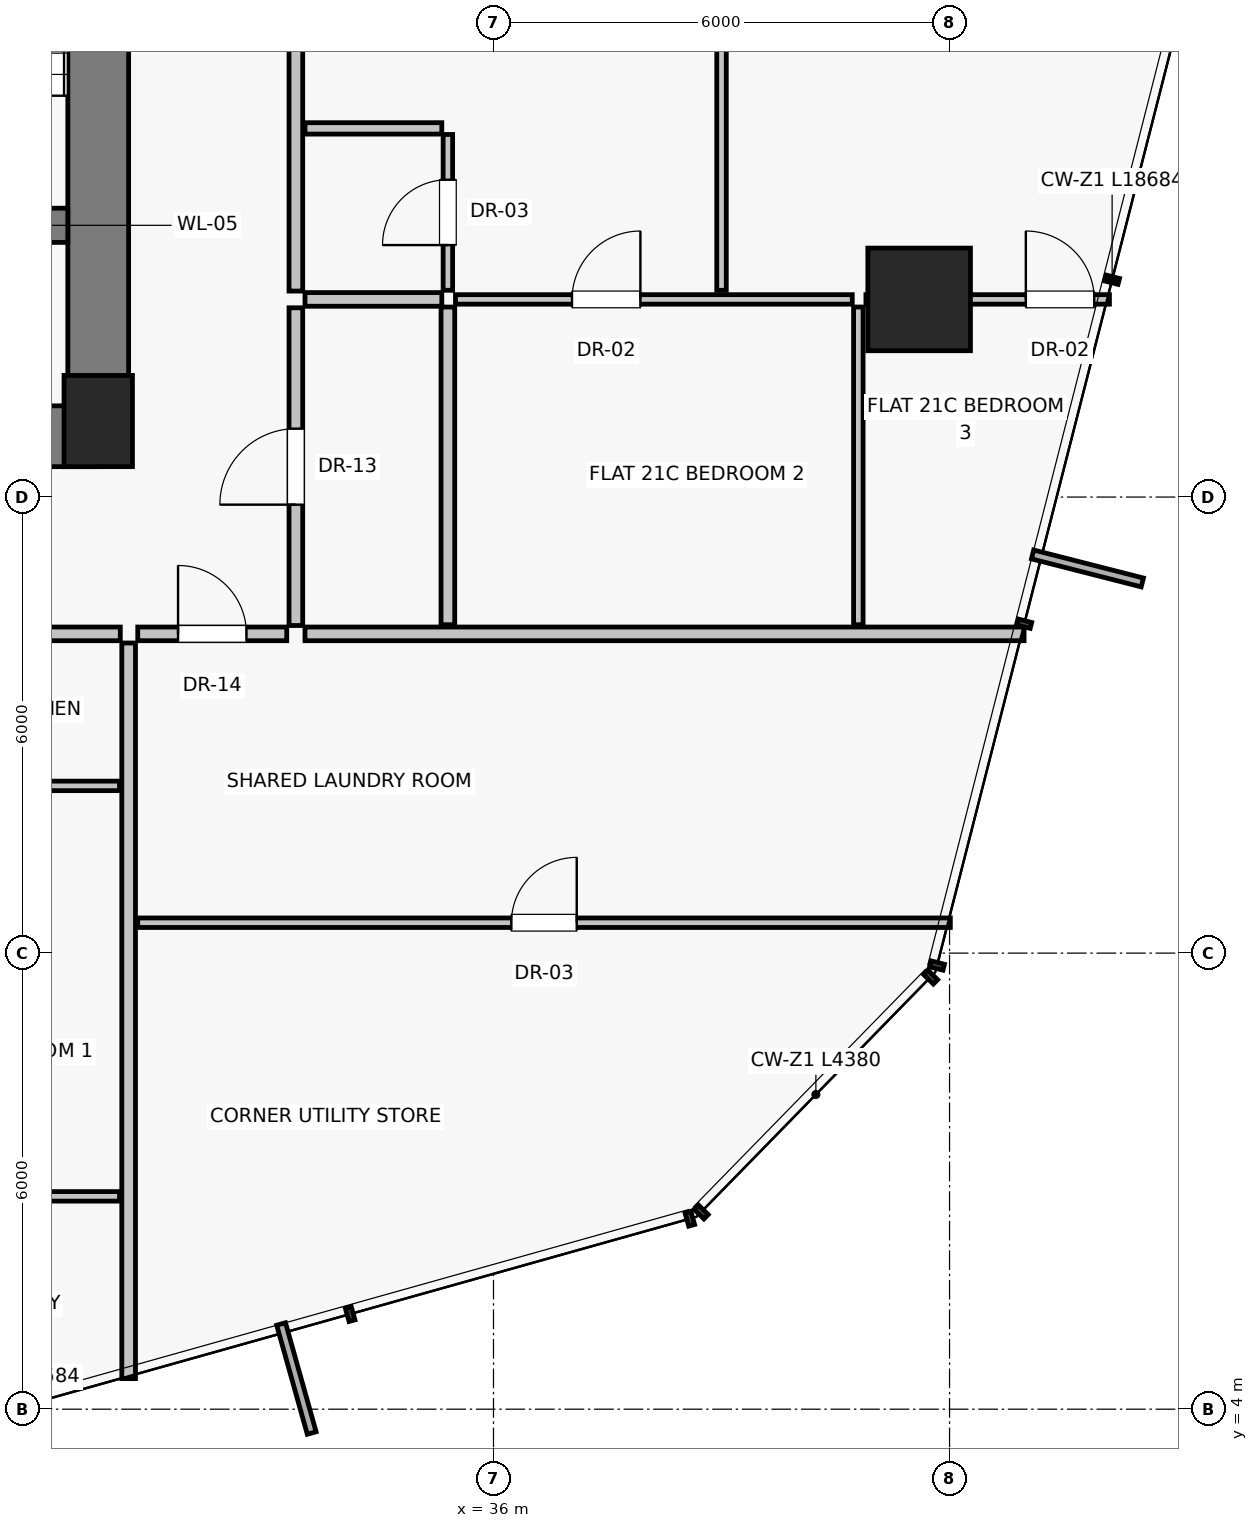
"""IFC4 building model, lengths in metres.
Left out: names, types, materials, properties, quantities, classifications, styles, units other than length and angle.
Written with IfcOpenShell. Run it as: python <this file> out.ifc"""

import sys

from ifc_helpers import new_model, si_unit, direction, frame, frame_2d, origin, origin_2d, place, context, subcontext, project, spatial, rectangle, extrude, source, transform, mapped, element, fill, save


model = new_model("IFC4")
c1 = context("Model", 3, precision=1e-05, world=origin(), true_north=direction((0.0, 1.0)))
c2 = subcontext(c1, "Body", "Model", "MODEL_VIEW")
j1 = project(units=[si_unit("LENGTHUNIT", "METRE"), si_unit("PLANEANGLEUNIT", "RADIAN")], contexts=[c1])
p1 = place(None, origin())
s1 = spatial("IfcSite", under=j1, at=p1, CompositionType="ELEMENT")
p2 = place(p1, origin())
s2 = spatial("IfcBuilding", under=s1, at=p2, CompositionType="ELEMENT")
p3 = place(p2, frame((0.0, 0.0, 77.1)))
s3 = spatial("IfcBuildingStorey", under=s2, at=p3, CompositionType="ELEMENT", Elevation=77.1)
p4 = place(p3, frame((30.8, 17.0, 0.0), z_axis=(0.0, 0.0, 1.0), x_axis=(1.0, 0.0, 0.0)))
e1 = element("IfcColumn", 1, at=p4, inside=s3, PredefinedType="PILASTER", context=c2, shape_type="SweptSolid", body=[
    extrude(rectangle(XDim=0.9, YDim=1.2, at=origin_2d()), origin(), (0.0, 0.0, 1.0), 3.25),
])
p5 = place(p3, frame((41.6, 18.6, 0.0), z_axis=(0.0, 0.0, 1.0), x_axis=(1.0, 0.0, 0.0)))
e2 = element("IfcColumn", 2, at=p5, inside=s3, PredefinedType="COLUMN", context=c2, shape_type="SweptSolid", body=[
    extrude(rectangle(XDim=1.35, YDim=1.35, at=origin_2d()), origin(), (0.0, 0.0, 1.0), 3.25),
])
p6 = place(p3, frame((30.8, 16.8, 0.0), z_axis=(0.0, 0.0, 1.0), x_axis=(0.0, 1.0, 0.0)))
e3 = element("IfcWall", 3, at=p6, inside=s3, PredefinedType="SHEAR", context=c2, shape_type="SweptSolid", body=[
    extrude(rectangle(XDim=14.2, YDim=0.8, at=frame_2d((7.1, 0.0))), origin(), (0.0, 0.0, 1.0), 2.93),
])
p7 = place(p3, frame((24.95, 16.8, 0.0), z_axis=(0.0, 0.0, 1.0), x_axis=(1.0, 0.0, 0.0)))
e4 = element("IfcWall", 4, at=p7, inside=s3, PredefinedType="SHEAR", context=c2, shape_type="SweptSolid", body=[
    extrude(rectangle(XDim=5.85, YDim=0.8, at=frame_2d((2.925, 0.0))), origin(), (0.0, 0.0, 1.0), 2.93),
])
p8 = place(p7, frame((2.15, 0.0, 0.0)))
e5 = element("IfcOpeningElement", 5, at=p8, cuts=e4, PredefinedType="OPENING", context=c2, shape_type="SweptSolid", body=[
    extrude(rectangle(XDim=1.2, YDim=2.03, at=frame_2d((0.6, 1.015))), frame((0.0, 0.41, 0.0), z_axis=(0.0, -1.0, 0.0), x_axis=(1.0, 0.0, 0.0)), (0.0, 0.0, 1.0), 0.82),
])
p9 = place(p3, frame((26.975, 19.575, 0.0), z_axis=(0.0, 0.0, 1.0), x_axis=(1.0, 0.0, 0.0)))
e6 = element("IfcWall", 6, at=p9, inside=s3, PredefinedType="SHEAR", context=c2, shape_type="SweptSolid", body=[
    extrude(rectangle(XDim=3.425, YDim=0.45, at=frame_2d((1.712, 0.0))), origin(), (0.0, 0.0, 1.0), 2.93),
])
p10 = place(p9, frame((1.05, 0.0, 0.0)))
e7 = element("IfcOpeningElement", 7, at=p10, cuts=e6, PredefinedType="OPENING", context=c2, shape_type="SweptSolid", body=[
    extrude(rectangle(XDim=1.1, YDim=2.03, at=frame_2d((0.55, 1.015))), frame((0.0, 0.235, 0.0), z_axis=(0.0, -1.0, 0.0), x_axis=(1.0, 0.0, 0.0)), (0.0, 0.0, 1.0), 0.47),
])
p11 = place(p3, frame((31.2, 14.08, 0.0), z_axis=(0.0, 0.0, 1.0), x_axis=(0.0, -1.0, 0.0)))
e8 = element("IfcWall", 8, at=p11, inside=s3, PredefinedType="PARTITIONING", context=c2, shape_type="SweptSolid", body=[
    extrude(rectangle(XDim=9.678, YDim=0.18, at=frame_2d((4.839, 0.0))), origin(), (0.0, 0.0, 1.0), 2.93),
])
p12 = place(p3, frame((21.23, 14.2, 0.0), z_axis=(0.0, 0.0, 1.0), x_axis=(1.0, 0.0, 0.0)))
e9 = element("IfcWall", 9, at=p12, inside=s3, PredefinedType="PARTITIONING", context=c2, shape_type="SweptSolid", body=[
    extrude(rectangle(XDim=9.86, YDim=0.18, at=frame_2d((4.93, 0.0))), origin(), (0.0, 0.0, 1.0), 2.93),
])
p13 = place(p12, frame((3.276, 0.0, 0.0)))
e10 = element("IfcOpeningElement", 10, at=p13, cuts=e9, PredefinedType="OPENING", context=c2, shape_type="SweptSolid", body=[
    extrude(rectangle(XDim=0.95, YDim=2.02, at=frame_2d((0.475, 1.01))), frame((0.0, 0.1, 0.0), z_axis=(0.0, -1.0, 0.0), x_axis=(1.0, 0.0, 0.0)), (0.0, 0.0, 1.0), 0.2),
])
p14 = place(p3, frame((26.692, 6.8, 0.0), z_axis=(0.0, 0.0, 1.0), x_axis=(1.0, 0.0, 0.0)))
e11 = element("IfcWall", 11, at=p14, inside=s3, PredefinedType="PARTITIONING", context=c2, shape_type="SweptSolid", body=[
    extrude(rectangle(XDim=4.388, YDim=0.125, at=frame_2d((2.194, 0.0))), origin(), (0.0, 0.0, 1.0), 2.08),
])
p15 = place(p3, frame((26.692, 12.2, 0.0), z_axis=(0.0, 0.0, 1.0), x_axis=(1.0, 0.0, 0.0)))
e12 = element("IfcWall", 12, at=p15, inside=s3, PredefinedType="PARTITIONING", context=c2, shape_type="SweptSolid", body=[
    extrude(rectangle(XDim=4.388, YDim=0.125, at=frame_2d((2.194, 0.0))), origin(), (0.0, 0.0, 1.0), 2.93),
])
p16 = place(p3, frame((33.52, 14.2, 0.0), z_axis=(0.0, 0.0, 1.0), x_axis=(1.0, 0.0, 0.0)))
e13 = element("IfcWall", 13, at=p16, inside=s3, PredefinedType="PARTITIONING", context=c2, shape_type="SweptSolid", body=[
    extrude(rectangle(XDim=9.46, YDim=0.18, at=frame_2d((4.73, 0.0))), origin(), (0.0, 0.0, 1.0), 2.93),
])
p17 = place(p3, frame((33.4, 14.31, 0.0), z_axis=(0.0, 0.0, 1.0), x_axis=(0.0, 1.0, 0.0)))
e14 = element("IfcWall", 14, at=p17, inside=s3, PredefinedType="PARTITIONING", context=c2, shape_type="SweptSolid", body=[
    extrude(rectangle(XDim=4.18, YDim=0.18, at=frame_2d((2.09, 0.0))), origin(), (0.0, 0.0, 1.0), 2.93),
])
p18 = place(p17, frame((1.59, 0.0, 0.0)))
e15 = element("IfcOpeningElement", 15, at=p18, cuts=e14, PredefinedType="OPENING", context=c2, shape_type="SweptSolid", body=[
    extrude(rectangle(XDim=1.0, YDim=2.01, at=frame_2d((0.5, 1.005))), frame((0.0, 0.1, 0.0), z_axis=(0.0, -1.0, 0.0), x_axis=(1.0, 0.0, 0.0)), (0.0, 0.0, 1.0), 0.2),
])
p19 = place(p3, frame((33.4, 18.71, 0.0), z_axis=(0.0, 0.0, 1.0), x_axis=(0.0, 1.0, 0.0)))
e16 = element("IfcWall", 16, at=p19, inside=s3, PredefinedType="PARTITIONING", context=c2, shape_type="SweptSolid", body=[
    extrude(rectangle(XDim=14.78, YDim=0.18, at=frame_2d((7.39, 0.0))), origin(), (0.0, 0.0, 1.0), 2.93),
])
p20 = place(p19, frame((5.94, 0.0, 0.0)))
e17 = element("IfcOpeningElement", 17, at=p20, cuts=e16, PredefinedType="OPENING", context=c2, shape_type="SweptSolid", body=[
    extrude(rectangle(XDim=0.95, YDim=2.02, at=frame_2d((0.475, 1.01))), frame((0.0, 0.1, 0.0), z_axis=(0.0, -1.0, 0.0), x_axis=(1.0, 0.0, 0.0)), (0.0, 0.0, 1.0), 0.2),
])
p21 = place(p3, frame((40.8, 14.32, 0.0), z_axis=(0.0, 0.0, 1.0), x_axis=(0.0, 1.0, 0.0)))
e18 = element("IfcWall", 18, at=p21, inside=s3, PredefinedType="PARTITIONING", context=c2, shape_type="SweptSolid", body=[
    extrude(rectangle(XDim=4.18, YDim=0.125, at=frame_2d((2.09, 0.0))), origin(), (0.0, 0.0, 1.0), 2.93),
])
p22 = place(p3, frame((40.9, 18.6, 0.0), z_axis=(0.0, 0.0, 1.0), x_axis=(1.0, 0.0, 0.0)))
e19 = element("IfcWall", 19, at=p22, inside=s3, PredefinedType="PARTITIONING", context=c2, shape_type="SweptSolid", body=[
    extrude(rectangle(XDim=3.204, YDim=0.125, at=frame_2d((1.602, 0.0))), origin(), (0.0, 0.0, 1.0), 2.229),
])
p23 = place(p22, frame((2.104, 0.0, 0.0)))
e20 = element("IfcOpeningElement", 20, at=p23, cuts=e19, PredefinedType="OPENING", context=c2, shape_type="SweptSolid", body=[
    extrude(rectangle(XDim=0.9, YDim=2.01, at=frame_2d((0.45, 1.005))), frame((0.0, 0.073, 0.0), z_axis=(0.0, -1.0, 0.0), x_axis=(1.0, 0.0, 0.0)), (0.0, 0.0, 1.0), 0.145),
])
p24 = place(p3, frame((39.0, 18.72, 0.0), z_axis=(0.0, 0.0, 1.0), x_axis=(0.0, 1.0, 0.0)))
e21 = element("IfcWall", 21, at=p24, inside=s3, PredefinedType="PARTITIONING", context=c2, shape_type="SweptSolid", body=[
    extrude(rectangle(XDim=10.56, YDim=0.125, at=frame_2d((5.28, 0.0))), origin(), (0.0, 0.0, 1.0), 2.93),
])
p25 = place(p24, frame((4.78, 0.0, 0.0)))
e22 = element("IfcOpeningElement", 22, at=p25, cuts=e21, PredefinedType="OPENING", context=c2, shape_type="SweptSolid", body=[
    extrude(rectangle(XDim=1.0, YDim=2.01, at=frame_2d((0.5, 1.005))), frame((0.0, 0.073, 0.0), z_axis=(0.0, -1.0, 0.0), x_axis=(1.0, 0.0, 0.0)), (0.0, 0.0, 1.0), 0.145),
])
p26 = place(p3, frame((35.4, 14.32, 0.0), z_axis=(0.0, 0.0, 1.0), x_axis=(0.0, 1.0, 0.0)))
e23 = element("IfcWall", 23, at=p26, inside=s3, PredefinedType="PARTITIONING", context=c2, shape_type="SweptSolid", body=[
    extrude(rectangle(XDim=4.18, YDim=0.18, at=frame_2d((2.09, 0.0))), origin(), (0.0, 0.0, 1.0), 2.93),
])
p27 = place(p3, frame((33.52, 18.6, 0.0), z_axis=(0.0, 0.0, 1.0), x_axis=(1.0, 0.0, 0.0)))
e24 = element("IfcWall", 24, at=p27, inside=s3, PredefinedType="PARTITIONING", context=c2, shape_type="SweptSolid", body=[
    extrude(rectangle(XDim=1.8, YDim=0.18, at=frame_2d((0.9, 0.0))), origin(), (0.0, 0.0, 1.0), 2.93),
])
p28 = place(p3, frame((35.5, 18.6, 0.0), z_axis=(0.0, 0.0, 1.0), x_axis=(1.0, 0.0, 0.0)))
e25 = element("IfcWall", 25, at=p28, inside=s3, PredefinedType="PARTITIONING", context=c2, shape_type="SweptSolid", body=[
    extrude(rectangle(XDim=5.22, YDim=0.125, at=frame_2d((2.61, 0.0))), origin(), (0.0, 0.0, 1.0), 2.229),
])
p29 = place(p28, frame((1.533, 0.0, 0.0)))
e26 = element("IfcOpeningElement", 26, at=p29, cuts=e25, PredefinedType="OPENING", context=c2, shape_type="SweptSolid", body=[
    extrude(rectangle(XDim=0.9, YDim=2.01, at=frame_2d((0.45, 1.005))), frame((0.0, 0.073, 0.0), z_axis=(0.0, -1.0, 0.0), x_axis=(1.0, 0.0, 0.0)), (0.0, 0.0, 1.0), 0.145),
])
p30 = place(p3, frame((33.52, 20.85, 0.0), z_axis=(0.0, 0.0, 1.0), x_axis=(1.0, 0.0, 0.0)))
e27 = element("IfcWall", 27, at=p30, inside=s3, PredefinedType="PARTITIONING", context=c2, shape_type="SweptSolid", body=[
    extrude(rectangle(XDim=1.8, YDim=0.15, at=frame_2d((0.9, 0.0))), origin(), (0.0, 0.0, 1.0), 2.93),
])
p31 = place(p3, frame((35.4, 18.72, 0.0), z_axis=(0.0, 0.0, 1.0), x_axis=(0.0, 1.0, 0.0)))
e28 = element("IfcWall", 28, at=p31, inside=s3, PredefinedType="PARTITIONING", context=c2, shape_type="SweptSolid", body=[
    extrude(rectangle(XDim=2.05, YDim=0.125, at=frame_2d((1.025, 0.0))), origin(), (0.0, 0.0, 1.0), 2.93),
])
p32 = place(p31, frame((0.595, 0.0, 0.0)))
e29 = element("IfcOpeningElement", 29, at=p32, cuts=e28, PredefinedType="OPENING", context=c2, shape_type="SweptSolid", body=[
    extrude(rectangle(XDim=0.86, YDim=2.01, at=frame_2d((0.43, 1.005))), frame((0.0, 0.073, 0.0), z_axis=(0.0, -1.0, 0.0), x_axis=(1.0, 0.0, 0.0)), (0.0, 0.0, 1.0), 0.145),
])
p33 = place(p3, frame((31.32, 14.2, 0.0), z_axis=(0.0, 0.0, 1.0), x_axis=(1.0, 0.0, 0.0)))
e30 = element("IfcWall", 30, at=p33, inside=s3, PredefinedType="PARTITIONING", context=c2, shape_type="SweptSolid", body=[
    extrude(rectangle(XDim=1.96, YDim=0.18, at=frame_2d((0.98, 0.0))), origin(), (0.0, 0.0, 1.0), 2.93),
])
p34 = place(p33, frame((0.53, 0.0, 0.0)))
e31 = element("IfcOpeningElement", 31, at=p34, cuts=e30, PredefinedType="OPENING", context=c2, shape_type="SweptSolid", body=[
    extrude(rectangle(XDim=0.9, YDim=2.01, at=frame_2d((0.45, 1.005))), frame((0.0, 0.1, 0.0), z_axis=(0.0, -1.0, 0.0), x_axis=(1.0, 0.0, 0.0)), (0.0, 0.0, 1.0), 0.2),
])
p35 = place(p3, frame((31.32, 10.4, 0.0), z_axis=(0.0, 0.0, 1.0), x_axis=(1.0, 0.0, 0.0)))
e32 = element("IfcWall", 32, at=p35, inside=s3, PredefinedType="PARTITIONING", context=c2, shape_type="SweptSolid", body=[
    extrude(rectangle(XDim=10.69, YDim=0.125, at=frame_2d((5.345, 0.0))), origin(), (0.0, 0.0, 1.0), 2.93),
])
p36 = place(p35, frame((4.915, 0.0, 0.0)))
e33 = element("IfcOpeningElement", 33, at=p36, cuts=e32, PredefinedType="OPENING", context=c2, shape_type="SweptSolid", body=[
    extrude(rectangle(XDim=0.86, YDim=2.01, at=frame_2d((0.43, 1.005))), frame((0.0, 0.073, 0.0), z_axis=(0.0, -1.0, 0.0), x_axis=(1.0, 0.0, 0.0)), (0.0, 0.0, 1.0), 0.145),
])
m1 = source(origin(), c2, "Body", "SweptSolid", [
    extrude(rectangle(XDim=1.0, YDim=2.01, at=frame_2d((0.5, 1.005))), frame((0.0, 0.025, 0.0), z_axis=(0.0, -1.0, 0.0), x_axis=(1.0, 0.0, 0.0)), (0.0, 0.0, 1.0), 0.05),
])
p37 = place(p18, origin())
e34 = element("IfcDoor", 34, at=p37, inside=s3, OperationType="SINGLE_SWING_LEFT", PredefinedType="DOOR", context=c2, shape_type="MappedRepresentation", body=[
    mapped(m1, transform((0.0, 0.0, 0.0), scale=1.0)),
])
fill(e15, e34)
m2 = source(origin(), c2, "Body", "SweptSolid", [
    extrude(rectangle(XDim=0.9, YDim=2.01, at=frame_2d((0.45, 1.005))), frame((0.0, 0.025, 0.0), z_axis=(0.0, -1.0, 0.0), x_axis=(1.0, 0.0, 0.0)), (0.0, 0.0, 1.0), 0.05),
])
p38 = place(p23, origin())
e35 = element("IfcDoor", 35, at=p38, inside=s3, OperationType="SINGLE_SWING_LEFT", PredefinedType="DOOR", context=c2, shape_type="MappedRepresentation", body=[
    mapped(m2, transform((0.0, 0.0, 0.0), scale=1.0)),
])
fill(e20, e35)
p39 = place(p29, origin())
e36 = element("IfcDoor", 36, at=p39, inside=s3, OperationType="SINGLE_SWING_RIGHT", PredefinedType="DOOR", context=c2, shape_type="MappedRepresentation", body=[
    mapped(m2, transform((0.0, 0.0, 0.0), scale=1.0)),
])
fill(e26, e36)
m3 = source(origin(), c2, "Body", "SweptSolid", [
    extrude(rectangle(XDim=0.86, YDim=2.01, at=frame_2d((0.43, 1.005))), frame((0.0, 0.025, 0.0), z_axis=(0.0, -1.0, 0.0), x_axis=(1.0, 0.0, 0.0)), (0.0, 0.0, 1.0), 0.05),
])
p40 = place(p32, origin())
e37 = element("IfcDoor", 37, at=p40, inside=s3, OperationType="SINGLE_SWING_LEFT", PredefinedType="DOOR", context=c2, shape_type="MappedRepresentation", body=[
    mapped(m3, transform((0.0, 0.0, 0.0), scale=1.0)),
])
fill(e29, e37)
p41 = place(p34, origin())
e38 = element("IfcDoor", 38, at=p41, inside=s3, OperationType="SINGLE_SWING_LEFT", PredefinedType="DOOR", context=c2, shape_type="MappedRepresentation", body=[
    mapped(m2, transform((0.0, 0.0, 0.0), scale=1.0)),
])
fill(e31, e38)
p42 = place(p36, origin())
e39 = element("IfcDoor", 39, at=p42, inside=s3, OperationType="SINGLE_SWING_RIGHT", PredefinedType="DOOR", context=c2, shape_type="MappedRepresentation", body=[
    mapped(m3, transform((0.0, 0.0, 0.0), scale=1.0)),
])
fill(e33, e39)
save(model, sys.argv[1])
